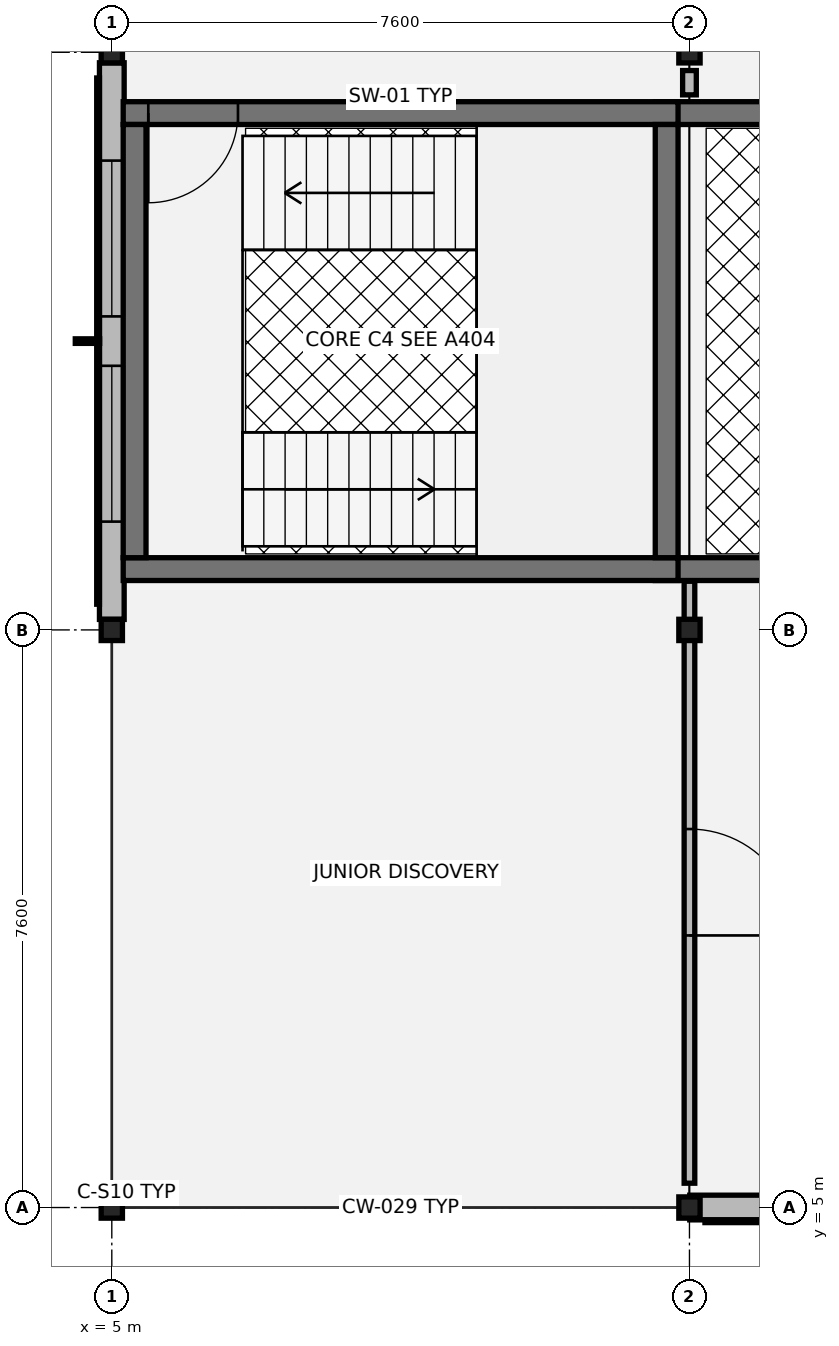
"""IFC4 building model, lengths in metres.
Left out: names, types, materials, properties, quantities, classifications, styles, units other than length and angle.
Written with IfcOpenShell. Run it as: python <this file> out.ifc"""

import sys

from ifc_helpers import new_model, si_unit, direction, frame, frame_2d, origin, origin_2d, place, context, subcontext, project, spatial, rectangle, i_section, extrude, element, fill, save


model = new_model("IFC4")
c1 = context("Model", 3, precision=1e-05, world=origin(), true_north=direction((0.0, 1.0)))
c2 = subcontext(c1, "Body", "Model", "MODEL_VIEW")
j1 = project(units=[si_unit("LENGTHUNIT", "METRE"), si_unit("PLANEANGLEUNIT", "RADIAN")], contexts=[c1])
p1 = place(None, origin())
s1 = spatial("IfcSite", under=j1, at=p1, CompositionType="ELEMENT")
p2 = place(p1, origin())
s2 = spatial("IfcBuilding", under=s1, at=p2, CompositionType="ELEMENT")
p3 = place(p2, frame((0.0, 0.0, 5.1)))
s3 = spatial("IfcBuildingStorey", under=s2, at=p3, CompositionType="ELEMENT", Elevation=5.1)
for number, where, z_axis, x_axis in (
    (1, (5.0, 5.0, 0.0), (0.0, 0.0, 1.0), (1.0, 0.0, 0.0)),
    (2, (5.0, 12.6, 0.0), (0.0, 0.0, 1.0), (1.0, 0.0, 0.0)),
    (3, (5.0, 20.2, 0.0), (0.0, 0.0, 1.0), (1.0, 0.0, 0.0)),
    (4, (12.6, 5.0, 0.0), (0.0, 0.0, 1.0), (1.0, 0.0, 0.0)),
    (5, (12.6, 12.6, 0.0), (0.0, 0.0, 1.0), (1.0, 0.0, 0.0)),
    (6, (12.6, 20.2, 0.0), (0.0, 0.0, 1.0), (1.0, 0.0, 0.0)),
):
    element("IfcColumn", number, at=place(p3, frame(where, z_axis=z_axis, x_axis=x_axis)), inside=s3, PredefinedType="COLUMN", context=c2, shape_type="SweptSolid", body=[
        extrude(i_section(OverallWidth=0.28, OverallDepth=0.28, WebThickness=0.01, FlangeThickness=0.018, at=origin_2d()), origin(), (0.0, 0.0, 1.0), 4.055),
    ])
p4 = place(p3, frame((12.604, 5.0, 0.0), z_axis=(0.0, 0.0, 1.0), x_axis=(1.0, 0.0, 0.0)))
e7 = element("IfcWall", 7, at=p4, inside=s3, PredefinedType="SOLIDWALL", context=c2, shape_type="SweptSolid", body=[
    extrude(rectangle(XDim=7.592, YDim=0.325, at=frame_2d((3.796, 0.0))), origin(), (0.0, 0.0, 1.0), 3.48),
])
p5 = place(p4, frame((1.421, 0.0, 0.8)))
e8 = element("IfcOpeningElement", 8, at=p5, cuts=e7, PredefinedType="OPENING", context=c2, shape_type="SweptSolid", body=[
    extrude(rectangle(XDim=2.05, YDim=2.18, at=frame_2d((1.025, 1.09))), frame((0.0, 0.172, 0.0), z_axis=(0.0, -1.0, 0.0), x_axis=(1.0, 0.0, 0.0)), (0.0, 0.0, 1.0), 0.345),
])
p6 = place(p4, frame((4.121, 0.0, 0.8)))
e9 = element("IfcOpeningElement", 9, at=p6, cuts=e7, PredefinedType="OPENING", context=c2, shape_type="SweptSolid", body=[
    extrude(rectangle(XDim=2.05, YDim=2.18, at=frame_2d((1.025, 1.09))), frame((0.0, 0.172, 0.0), z_axis=(0.0, -1.0, 0.0), x_axis=(1.0, 0.0, 0.0)), (0.0, 0.0, 1.0), 0.345),
])
p7 = place(p3, frame((5.0, 20.062, 0.0), z_axis=(0.0, 0.0, 1.0), x_axis=(0.0, -1.0, 0.0)))
e10 = element("IfcWall", 10, at=p7, inside=s3, PredefinedType="SOLIDWALL", context=c2, shape_type="SweptSolid", body=[
    extrude(rectangle(XDim=7.324, YDim=0.325, at=frame_2d((3.662, 0.0))), origin(), (0.0, 0.0, 1.0), 2.445),
])
p8 = place(p7, frame((1.287, 0.0, 0.25)))
e11 = element("IfcOpeningElement", 11, at=p8, cuts=e10, PredefinedType="OPENING", context=c2, shape_type="SweptSolid", body=[
    extrude(rectangle(XDim=2.05, YDim=2.18, at=frame_2d((1.025, 1.09))), frame((0.0, 0.172, 0.0), z_axis=(0.0, -1.0, 0.0), x_axis=(1.0, 0.0, 0.0)), (0.0, 0.0, 1.0), 0.345),
])
p9 = place(p7, frame((3.987, 0.0, 0.25)))
e12 = element("IfcOpeningElement", 12, at=p9, cuts=e10, PredefinedType="OPENING", context=c2, shape_type="SweptSolid", body=[
    extrude(rectangle(XDim=2.05, YDim=2.18, at=frame_2d((1.025, 1.09))), frame((0.0, 0.172, 0.0), z_axis=(0.0, -1.0, 0.0), x_axis=(1.0, 0.0, 0.0)), (0.0, 0.0, 1.0), 0.345),
])
p10 = place(p3, frame((12.15, 13.4, 0.0), z_axis=(0.0, 0.0, 1.0), x_axis=(1.0, 0.0, 0.0)))
e13 = element("IfcWall", 13, at=p10, inside=s3, PredefinedType="SHEAR", context=c2, shape_type="SweptSolid", body=[
    extrude(rectangle(XDim=5.1, YDim=0.3, at=frame_2d((2.55, 0.0))), origin(), (0.0, 0.0, 1.0), 3.902),
])
p11 = place(p3, frame((17.25, 19.4, 0.0), z_axis=(0.0, 0.0, 1.0), x_axis=(-1.0, 0.0, 0.0)))
e14 = element("IfcWall", 14, at=p11, inside=s3, PredefinedType="SHEAR", context=c2, shape_type="SweptSolid", body=[
    extrude(rectangle(XDim=5.1, YDim=0.3, at=frame_2d((2.55, 0.0))), origin(), (0.0, 0.0, 1.0), 3.902),
])
p12 = place(p11, frame((0.7, 0.0, 0.0)))
e15 = element("IfcOpeningElement", 15, at=p12, cuts=e14, PredefinedType="OPENING", context=c2, shape_type="SweptSolid", body=[
    extrude(rectangle(XDim=1.2, YDim=2.16, at=frame_2d((0.6, 1.08))), frame((0.0, 0.16, 0.0), z_axis=(0.0, -1.0, 0.0), x_axis=(1.0, 0.0, 0.0)), (0.0, 0.0, 1.0), 0.32),
])
p13 = place(p3, frame((5.15, 13.4, 0.0), z_axis=(0.0, 0.0, 1.0), x_axis=(1.0, 0.0, 0.0)))
e16 = element("IfcWall", 16, at=p13, inside=s3, PredefinedType="SHEAR", context=c2, shape_type="SweptSolid", body=[
    extrude(rectangle(XDim=7.3, YDim=0.3, at=frame_2d((3.65, 0.0))), origin(), (0.0, 0.0, 1.0), 3.902),
])
p14 = place(p3, frame((5.15, 19.4, 0.0), z_axis=(0.0, 0.0, 1.0), x_axis=(1.0, 0.0, 0.0)))
e17 = element("IfcWall", 17, at=p14, inside=s3, PredefinedType="SHEAR", context=c2, shape_type="SweptSolid", body=[
    extrude(rectangle(XDim=7.3, YDim=0.3, at=frame_2d((3.65, 0.0))), origin(), (0.0, 0.0, 1.0), 3.902),
])
p15 = place(p14, frame((0.33, 0.0, 0.0)))
e18 = element("IfcOpeningElement", 18, at=p15, cuts=e17, PredefinedType="OPENING", context=c2, shape_type="SweptSolid", body=[
    extrude(rectangle(XDim=1.18, YDim=2.18, at=frame_2d((0.59, 1.09))), frame((0.0, 0.16, 0.0), z_axis=(0.0, -1.0, 0.0), x_axis=(1.0, 0.0, 0.0)), (0.0, 0.0, 1.0), 0.32),
])
for number, where, z_axis, x_axis in (
    (19, (5.3, 13.55, 0.0), (0.0, 0.0, 1.0), (0.0, 1.0, 0.0)),
    (20, (12.3, 13.55, 0.0), (0.0, 0.0, 1.0), (0.0, 1.0, 0.0)),
):
    element("IfcWall", number, at=place(p3, frame(where, z_axis=z_axis, x_axis=x_axis)), inside=s3, PredefinedType="SHEAR", context=c2, shape_type="SweptSolid", body=[
        extrude(rectangle(XDim=5.7, YDim=0.3, at=frame_2d((2.85, 0.0))), origin(), (0.0, 0.0, 1.0), 3.902),
    ])
p16 = place(p3, frame((12.6, 19.64, 0.0), z_axis=(0.0, 0.0, 1.0), x_axis=(0.0, 1.0, 0.0)))
e21 = element("IfcWall", 21, at=p16, inside=s3, PredefinedType="PARTITIONING", context=c2, shape_type="SweptSolid", body=[
    extrude(rectangle(XDim=0.32, YDim=0.18, at=frame_2d((0.16, 0.0))), origin(), (0.0, 0.0, 1.0), 3.18),
])
p17 = place(p3, frame((12.6, 5.32, 0.0), z_axis=(0.0, 0.0, 1.0), x_axis=(0.0, 1.0, 0.0)))
e22 = element("IfcWall", 22, at=p17, inside=s3, PredefinedType="PARTITIONING", context=c2, shape_type="SweptSolid", body=[
    extrude(rectangle(XDim=7.92, YDim=0.14, at=frame_2d((3.96, 0.0))), origin(), (0.0, 0.0, 1.0), 3.18),
])
p18 = place(p17, frame((3.26, 0.0, 0.0)))
e23 = element("IfcOpeningElement", 23, at=p18, cuts=e22, PredefinedType="OPENING", context=c2, shape_type="SweptSolid", body=[
    extrude(rectangle(XDim=1.4, YDim=2.22, at=frame_2d((0.7, 1.11))), frame((0.0, 0.08, 0.0), z_axis=(0.0, -1.0, 0.0), x_axis=(1.0, 0.0, 0.0)), (0.0, 0.0, 1.0), 0.16),
])
p19 = place(p8, origin())
e24 = element("IfcWindow", 24, at=p19, inside=s3, PartitioningType="SINGLE_PANEL", PredefinedType="WINDOW", context=c2, shape_type="SweptSolid", body=[
    extrude(rectangle(XDim=2.05, YDim=2.18, at=frame_2d((1.025, 1.09))), frame((0.0, 0.03, 0.0), z_axis=(0.0, -1.0, 0.0), x_axis=(1.0, 0.0, 0.0)), (0.0, 0.0, 1.0), 0.06),
])
fill(e11, e24)
p20 = place(p9, origin())
e25 = element("IfcWindow", 25, at=p20, inside=s3, PartitioningType="SINGLE_PANEL", PredefinedType="WINDOW", context=c2, shape_type="SweptSolid", body=[
    extrude(rectangle(XDim=2.05, YDim=2.18, at=frame_2d((1.025, 1.09))), frame((0.0, 0.03, 0.0), z_axis=(0.0, -1.0, 0.0), x_axis=(1.0, 0.0, 0.0)), (0.0, 0.0, 1.0), 0.06),
])
fill(e12, e25)
p21 = place(p15, origin())
e26 = element("IfcDoor", 26, at=p21, inside=s3, OperationType="SINGLE_SWING_RIGHT", PredefinedType="DOOR", context=c2, shape_type="SweptSolid", body=[
    extrude(rectangle(XDim=1.18, YDim=2.18, at=frame_2d((0.59, 1.09))), frame((0.0, 0.025, 0.0), z_axis=(0.0, -1.0, 0.0), x_axis=(1.0, 0.0, 0.0)), (0.0, 0.0, 1.0), 0.05),
])
fill(e18, e26)
p22 = place(p18, origin())
e27 = element("IfcDoor", 27, at=p22, inside=s3, OperationType="SINGLE_SWING_RIGHT", PredefinedType="DOOR", context=c2, shape_type="SweptSolid", body=[
    extrude(rectangle(XDim=1.4, YDim=2.22, at=frame_2d((0.7, 1.11))), frame((0.0, 0.025, 0.0), z_axis=(0.0, -1.0, 0.0), x_axis=(1.0, 0.0, 0.0)), (0.0, 0.0, 1.0), 0.05),
])
fill(e23, e27)
save(model, sys.argv[1])
